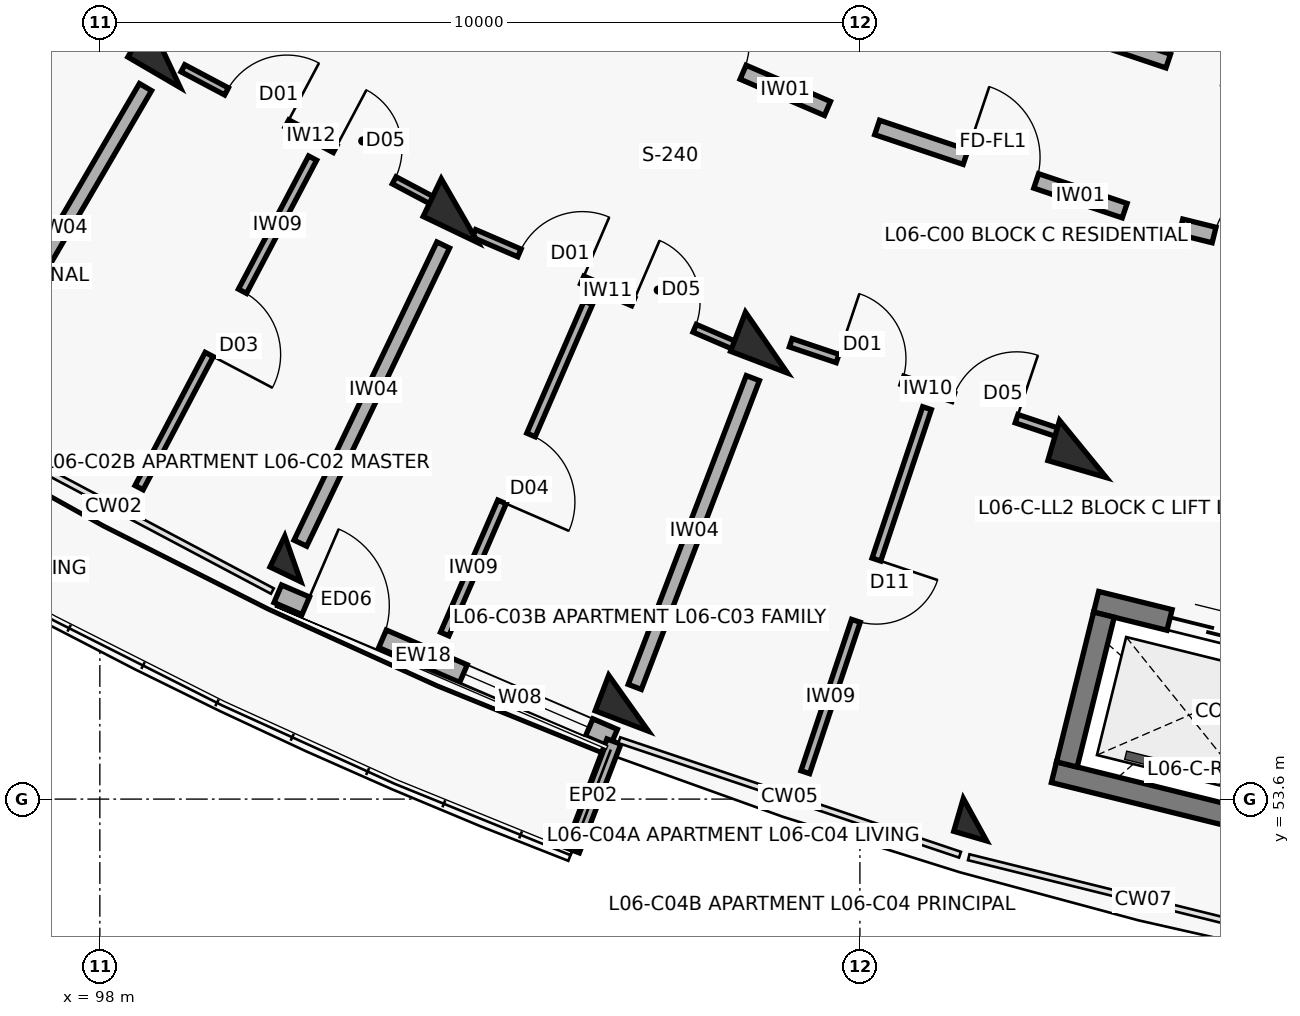
"""IFC4 building model, lengths in metres.
Left out: names, types, materials, properties, quantities, classifications, styles, units other than length and angle.
Written with IfcOpenShell. Run it as: python <this file> out.ifc"""

import sys

from ifc_helpers import new_model, si_unit, direction, frame, frame_2d, origin, origin_2d, place, context, subcontext, project, spatial, rectangle, extrude, element, fill, save


model = new_model("IFC4")
c1 = context("Model", 3, precision=1e-05, world=origin(), true_north=direction((0.0, 1.0)))
c2 = subcontext(c1, "Body", "Model", "MODEL_VIEW")
j1 = project(units=[si_unit("LENGTHUNIT", "METRE"), si_unit("PLANEANGLEUNIT", "RADIAN")], contexts=[c1])
p1 = place(None, origin())
s1 = spatial("IfcSite", under=j1, at=p1, CompositionType="ELEMENT")
p2 = place(p1, origin())
s2 = spatial("IfcBuilding", under=s1, at=p2, CompositionType="ELEMENT")
p3 = place(p2, frame((0.0, 0.0, 20.5)))
s3 = spatial("IfcBuildingStorey", under=s2, at=p3, CompositionType="ELEMENT", Elevation=20.5)
for number, where, z_axis, x_axis in (
    (1, (98.853, 63.4, 0.0), (0.0, 0.0, 1.0), (-0.504, -0.864, 0.0)),
    (2, (102.734, 61.341, 0.0), (0.0, 0.0, 1.0), (-0.432, -0.902, 0.0)),
):
    element("IfcColumn", number, at=place(p3, frame(where, z_axis=z_axis, x_axis=x_axis)), inside=s3, PredefinedType="COLUMN", context=c2, shape_type="SweptSolid", body=[
        extrude(rectangle(XDim=0.55, YDim=0.8, at=origin_2d()), origin(), (0.0, 0.0, 1.0), 3.1),
    ])
p4 = place(p3, frame((100.539, 56.76, 0.0), z_axis=(0.0, 0.0, 1.0), x_axis=(-0.432085748802, -0.901832526405, 0.0)))
e3 = element("IfcColumn", 3, at=p4, inside=s3, PredefinedType="COLUMN", context=c2, shape_type="SweptSolid", body=[
    extrude(rectangle(XDim=0.45, YDim=0.45, at=origin_2d()), origin(), (0.0, 0.0, 1.0), 3.1),
])
p5 = place(p3, frame((106.77, 59.606, 0.0), z_axis=(0.0, 0.0, 1.0), x_axis=(-0.357064076459, -0.934079892355, 0.0)))
e4 = element("IfcColumn", 4, at=p5, inside=s3, PredefinedType="COLUMN", context=c2, shape_type="SweptSolid", body=[
    extrude(rectangle(XDim=0.55, YDim=0.8, at=origin_2d()), origin(), (0.0, 0.0, 1.0), 3.1),
])
p6 = place(p3, frame((104.956, 54.861, 0.0), z_axis=(0.0, 0.0, 1.0), x_axis=(-0.357064076459, -0.934079892355, 0.0)))
e5 = element("IfcColumn", 5, at=p6, inside=s3, PredefinedType="COLUMN", context=c2, shape_type="SweptSolid", body=[
    extrude(rectangle(XDim=0.5, YDim=0.75, at=origin_2d()), origin(), (0.0, 0.0, 1.0), 3.1),
])
p7 = place(p3, frame((110.934, 58.207, 0.0), z_axis=(0.0, 0.0, 1.0), x_axis=(-0.27966144946, -0.96009867914, 0.0)))
e6 = element("IfcColumn", 6, at=p7, inside=s3, PredefinedType="COLUMN", context=c2, shape_type="SweptSolid", body=[
    extrude(rectangle(XDim=0.55, YDim=0.8, at=origin_2d()), origin(), (0.0, 0.0, 1.0), 3.1),
])
p8 = place(p3, frame((109.513, 53.329, 0.0), z_axis=(0.0, 0.0, 1.0), x_axis=(-0.27966144946, -0.96009867914, 0.0)))
e7 = element("IfcColumn", 7, at=p8, inside=s3, PredefinedType="COLUMN", context=c2, shape_type="SweptSolid", body=[
    extrude(rectangle(XDim=0.45, YDim=0.45, at=origin_2d()), origin(), (0.0, 0.0, 1.0), 3.1),
])
p9 = place(p3, frame((100.341, 56.301, 0.0), z_axis=(0.0, 0.0, 1.0), x_axis=(0.918737524932, -0.39486878869, 0.0)))
e8 = element("IfcWall", 8, at=p9, inside=s3, PredefinedType="SOLIDWALL", context=c2, shape_type="SweptSolid", body=[
    extrude(rectangle(XDim=4.809, YDim=0.252, at=frame_2d((2.405, 0.0))), origin(), (0.0, 0.0, 1.0), 2.25),
])
p10 = place(p9, frame((0.4, 0.0, 0.0)))
e9 = element("IfcOpeningElement", 9, at=p10, cuts=e8, PredefinedType="OPENING", context=c2, shape_type="SweptSolid", body=[
    extrude(rectangle(XDim=1.1, YDim=2.15, at=frame_2d((0.55, 1.075))), frame((0.0, 0.136, 0.0), z_axis=(0.0, -1.0, 0.0), x_axis=(1.0, 0.0, 0.0)), (0.0, 0.0, 1.0), 0.272),
])
p11 = place(p9, frame((2.659, 0.0, 0.35)))
e10 = element("IfcOpeningElement", 10, at=p11, cuts=e8, PredefinedType="OPENING", context=c2, shape_type="SweptSolid", body=[
    extrude(rectangle(XDim=1.8, YDim=1.65, at=frame_2d((0.9, 0.825))), frame((0.0, 0.136, 0.0), z_axis=(0.0, -1.0, 0.0), x_axis=(1.0, 0.0, 0.0)), (0.0, 0.0, 1.0), 0.272),
])
p12 = place(p3, frame((104.763, 54.357, 0.0), z_axis=(0.0, 0.0, 1.0), x_axis=(-0.356957296461, -0.934120703391, 0.0)))
e11 = element("IfcWall", 11, at=p12, inside=s3, PredefinedType="PARAPET", context=c2, shape_type="SweptSolid", body=[
    extrude(rectangle(XDim=1.53, YDim=0.195, at=frame_2d((0.765, 0.0))), origin(), (0.0, 0.0, 1.0), 2.25),
])
p13 = place(p3, frame((111.108, 56.196, 0.0), z_axis=(0.0, 0.0, 1.0), x_axis=(0.970706856107, -0.240266933861, 0.0)))
e12 = element("IfcWall", 12, at=p13, inside=s3, PredefinedType="SHEAR", context=c2, shape_type="SweptSolid", body=[
    extrude(rectangle(XDim=3.09, YDim=0.28, at=frame_2d((1.545, 0.0))), origin(), (0.0, 0.0, 1.0), 3.1),
])
p14 = place(p13, frame((0.995, 0.0, 0.0)))
e13 = element("IfcOpeningElement", 13, at=p14, cuts=e12, PredefinedType="OPENING", context=c2, shape_type="SweptSolid", body=[
    extrude(rectangle(XDim=1.1, YDim=2.15, at=frame_2d((0.55, 1.075))), frame((0.0, 0.15, 0.0), z_axis=(0.0, -1.0, 0.0), x_axis=(1.0, 0.0, 0.0)), (0.0, 0.0, 1.0), 0.3),
])
p15 = place(p3, frame((110.553, 53.954, 0.0), z_axis=(0.0, 0.0, 1.0), x_axis=(0.970725280816, -0.240192483614, 0.0)))
e14 = element("IfcWall", 14, at=p15, inside=s3, PredefinedType="SHEAR", context=c2, shape_type="SweptSolid", body=[
    extrude(rectangle(XDim=3.09, YDim=0.28, at=frame_2d((1.545, 0.0))), origin(), (0.0, 0.0, 1.0), 3.1),
])
p16 = place(p3, frame((111.21, 56.027, 0.0), z_axis=(0.0, 0.0, 1.0), x_axis=(-0.240186044774, -0.970726873995, 0.0)))
e15 = element("IfcWall", 15, at=p16, inside=s3, PredefinedType="SHEAR", context=c2, shape_type="SweptSolid", body=[
    extrude(rectangle(XDim=2.03, YDim=0.28, at=frame_2d((1.015, 0.0))), origin(), (0.0, 0.0, 1.0), 3.1),
])
p17 = place(p3, frame((98.504, 67.072, 0.0), z_axis=(0.0, 0.0, 1.0), x_axis=(-0.540338452216, -0.841447774408, 0.0)))
e16 = element("IfcWall", 16, at=p17, inside=s3, PredefinedType="PARTITIONING", context=c2, shape_type="SweptSolid", body=[
    extrude(rectangle(XDim=7.95, YDim=0.14, at=frame_2d((3.975, 0.0))), origin(), (0.0, 0.0, 1.0), 2.08),
])
p18 = place(p17, frame((6.05, 0.0, 0.0)))
e17 = element("IfcOpeningElement", 17, at=p18, cuts=e16, PredefinedType="OPENING", context=c2, shape_type="SweptSolid", body=[
    extrude(rectangle(XDim=0.92, YDim=2.1, at=frame_2d((0.46, 1.05))), frame((0.0, 0.08, 0.0), z_axis=(0.0, -1.0, 0.0), x_axis=(1.0, 0.0, 0.0)), (0.0, 0.0, 1.0), 0.16),
])
p19 = place(p3, frame((99.093, 63.216, 0.0), z_axis=(0.0, 0.0, 1.0), x_axis=(0.883432667361, -0.468558131121, 0.0)))
e18 = element("IfcWall", 18, at=p19, inside=s3, PredefinedType="PARTITIONING", context=c2, shape_type="SweptSolid", body=[
    extrude(rectangle(XDim=3.797, YDim=0.105, at=frame_2d((1.899, 0.0))), origin(), (0.0, 0.0, 1.0), 2.08),
])
p20 = place(p19, frame((0.65, 0.0, 0.0)))
e19 = element("IfcOpeningElement", 19, at=p20, cuts=e18, PredefinedType="OPENING", context=c2, shape_type="SweptSolid", body=[
    extrude(rectangle(XDim=0.9, YDim=2.1, at=frame_2d((0.45, 1.05))), frame((0.0, 0.062, 0.0), z_axis=(0.0, -1.0, 0.0), x_axis=(1.0, 0.0, 0.0)), (0.0, 0.0, 1.0), 0.125),
])
p21 = place(p19, frame((2.267, 0.0, 0.0)))
e20 = element("IfcOpeningElement", 20, at=p21, cuts=e18, PredefinedType="OPENING", context=c2, shape_type="SweptSolid", body=[
    extrude(rectangle(XDim=0.88, YDim=2.1, at=frame_2d((0.44, 1.05))), frame((0.0, 0.062, 0.0), z_axis=(0.0, -1.0, 0.0), x_axis=(1.0, 0.0, 0.0)), (0.0, 0.0, 1.0), 0.125),
])
p22 = place(p3, frame((100.799, 62.034, 0.0), z_axis=(0.0, 0.0, 1.0), x_axis=(-0.465869641373, -0.884853364828, 0.0)))
e21 = element("IfcWall", 21, at=p22, inside=s3, PredefinedType="PARTITIONING", context=c2, shape_type="SweptSolid", body=[
    extrude(rectangle(XDim=4.9, YDim=0.12, at=frame_2d((2.45, 0.0))), origin(), (0.0, 0.0, 1.0), 2.08),
])
p23 = place(p22, frame((1.98, 0.0, 0.0)))
e22 = element("IfcOpeningElement", 22, at=p23, cuts=e21, PredefinedType="OPENING", context=c2, shape_type="SweptSolid", body=[
    extrude(rectangle(XDim=0.94, YDim=2.1, at=frame_2d((0.47, 1.05))), frame((0.0, 0.07, 0.0), z_axis=(0.0, -1.0, 0.0), x_axis=(1.0, 0.0, 0.0)), (0.0, 0.0, 1.0), 0.14),
])
p24 = place(p3, frame((98.601, 62.968, 0.0), z_axis=(0.0, 0.0, 1.0), x_axis=(-0.504216452091, -0.863577309475, 0.0)))
e23 = element("IfcWall", 23, at=p24, inside=s3, PredefinedType="SOLIDWALL", context=c2, shape_type="SweptSolid", body=[
    extrude(rectangle(XDim=4.35, YDim=0.185, at=frame_2d((2.175, 0.0))), origin(), (0.0, 0.0, 1.0), 2.08),
])
p25 = place(p3, frame((104.417, 64.044, 0.0), z_axis=(0.0, 0.0, 1.0), x_axis=(0.918718172399, -0.394913813008, 0.0)))
e24 = element("IfcWall", 24, at=p25, inside=s3, PredefinedType="SOLIDWALL", context=c2, shape_type="SweptSolid", body=[
    extrude(rectangle(XDim=3.436, YDim=0.2, at=frame_2d((1.718, 0.0))), origin(), (0.0, 0.0, 1.0), 2.08),
])
p26 = place(p25, frame((1.208, 0.0, 0.0)))
e25 = element("IfcOpeningElement", 25, at=p26, cuts=e24, PredefinedType="OPENING", context=c2, shape_type="SweptSolid", body=[
    extrude(rectangle(XDim=1.02, YDim=2.15, at=frame_2d((0.51, 1.075))), frame((0.0, 0.11, 0.0), z_axis=(0.0, -1.0, 0.0), x_axis=(1.0, 0.0, 0.0)), (0.0, 0.0, 1.0), 0.22),
])
p27 = place(p3, frame((102.923, 61.042, 0.0), z_axis=(0.0, 0.0, 1.0), x_axis=(0.918716859611, -0.394916867033, 0.0)))
e26 = element("IfcWall", 26, at=p27, inside=s3, PredefinedType="PARTITIONING", context=c2, shape_type="SweptSolid", body=[
    extrude(rectangle(XDim=3.809, YDim=0.11, at=frame_2d((1.905, 0.0))), origin(), (0.0, 0.0, 1.0), 2.08),
])
p28 = place(p27, frame((0.65, 0.0, 0.0)))
e27 = element("IfcOpeningElement", 27, at=p28, cuts=e26, PredefinedType="OPENING", context=c2, shape_type="SweptSolid", body=[
    extrude(rectangle(XDim=0.9, YDim=2.1, at=frame_2d((0.45, 1.05))), frame((0.0, 0.065, 0.0), z_axis=(0.0, -1.0, 0.0), x_axis=(1.0, 0.0, 0.0)), (0.0, 0.0, 1.0), 0.13),
])
p29 = place(p27, frame((2.28, 0.0, 0.0)))
e28 = element("IfcOpeningElement", 28, at=p29, cuts=e26, PredefinedType="OPENING", context=c2, shape_type="SweptSolid", body=[
    extrude(rectangle(XDim=0.88, YDim=2.1, at=frame_2d((0.44, 1.05))), frame((0.0, 0.065, 0.0), z_axis=(0.0, -1.0, 0.0), x_axis=(1.0, 0.0, 0.0)), (0.0, 0.0, 1.0), 0.13),
])
p30 = place(p3, frame((104.426, 60.13, 0.0), z_axis=(0.0, 0.0, 1.0), x_axis=(-0.39765647791, -0.917534372967, 0.0)))
e29 = element("IfcWall", 29, at=p30, inside=s3, PredefinedType="PARTITIONING", context=c2, shape_type="SweptSolid", body=[
    extrude(rectangle(XDim=4.75, YDim=0.12, at=frame_2d((2.375, 0.0))), origin(), (0.0, 0.0, 1.0), 2.08),
])
p31 = place(p30, frame((1.895, 0.0, 0.0)))
e30 = element("IfcOpeningElement", 30, at=p31, cuts=e29, PredefinedType="OPENING", context=c2, shape_type="SweptSolid", body=[
    extrude(rectangle(XDim=0.96, YDim=2.1, at=frame_2d((0.48, 1.05))), frame((0.0, 0.07, 0.0), z_axis=(0.0, -1.0, 0.0), x_axis=(1.0, 0.0, 0.0)), (0.0, 0.0, 1.0), 0.14),
])
p32 = place(p3, frame((102.518, 60.89, 0.0), z_axis=(0.0, 0.0, 1.0), x_axis=(-0.432108769108, -0.901821496561, 0.0)))
e31 = element("IfcWall", 31, at=p32, inside=s3, PredefinedType="SOLIDWALL", context=c2, shape_type="SweptSolid", body=[
    extrude(rectangle(XDim=4.35, YDim=0.185, at=frame_2d((2.175, 0.0))), origin(), (0.0, 0.0, 1.0), 2.08),
])
p33 = place(p3, frame((108.227, 62.437, 0.0), z_axis=(0.0, 0.0, 1.0), x_axis=(0.947884468821, -0.318614239745, 0.0)))
e32 = element("IfcWall", 32, at=p33, inside=s3, PredefinedType="SOLIDWALL", context=c2, shape_type="SweptSolid", body=[
    extrude(rectangle(XDim=3.436, YDim=0.2, at=frame_2d((1.718, 0.0))), origin(), (0.0, 0.0, 1.0), 2.08),
])
p34 = place(p33, frame((1.228, 0.0, 0.0)))
e33 = element("IfcOpeningElement", 33, at=p34, cuts=e32, PredefinedType="OPENING", context=c2, shape_type="SweptSolid", body=[
    extrude(rectangle(XDim=0.98, YDim=2.15, at=frame_2d((0.49, 1.075))), frame((0.0, 0.11, 0.0), z_axis=(0.0, -1.0, 0.0), x_axis=(1.0, 0.0, 0.0)), (0.0, 0.0, 1.0), 0.22),
])
p35 = place(p3, frame((108.958, 64.352, 0.0), z_axis=(0.0, 0.0, 1.0), x_axis=(0.94787351033, -0.318646839643, 0.0)))
e34 = element("IfcWall", 34, at=p35, inside=s3, PredefinedType="SOLIDWALL", context=c2, shape_type="SweptSolid", body=[
    extrude(rectangle(XDim=3.269, YDim=0.19, at=frame_2d((1.634, 0.0))), origin(), (0.0, 0.0, 1.0), 2.08),
])
p36 = place(p35, frame((1.184, 0.0, 0.0)))
e35 = element("IfcOpeningElement", 35, at=p36, cuts=e34, PredefinedType="OPENING", context=c2, shape_type="SweptSolid", body=[
    extrude(rectangle(XDim=0.9, YDim=2.1, at=frame_2d((0.45, 1.05))), frame((0.0, 0.105, 0.0), z_axis=(0.0, -1.0, 0.0), x_axis=(1.0, 0.0, 0.0)), (0.0, 0.0, 1.0), 0.21),
])
p37 = place(p3, frame((107.09, 59.604, 0.0), z_axis=(0.0, 0.0, 1.0), x_axis=(0.947873924847, -0.318645606584, 0.0)))
e36 = element("IfcWall", 36, at=p37, inside=s3, PredefinedType="PARTITIONING", context=c2, shape_type="SweptSolid", body=[
    extrude(rectangle(XDim=3.785, YDim=0.115, at=frame_2d((1.893, 0.0))), origin(), (0.0, 0.0, 1.0), 2.08),
])
p38 = place(p37, frame((0.65, 0.0, 0.0)))
e37 = element("IfcOpeningElement", 37, at=p38, cuts=e36, PredefinedType="OPENING", context=c2, shape_type="SweptSolid", body=[
    extrude(rectangle(XDim=0.9, YDim=2.1, at=frame_2d((0.45, 1.05))), frame((0.0, 0.067, 0.0), z_axis=(0.0, -1.0, 0.0), x_axis=(1.0, 0.0, 0.0)), (0.0, 0.0, 1.0), 0.135),
])
p39 = place(p37, frame((2.255, 0.0, 0.0)))
e38 = element("IfcOpeningElement", 38, at=p39, cuts=e36, PredefinedType="OPENING", context=c2, shape_type="SweptSolid", body=[
    extrude(rectangle(XDim=0.88, YDim=2.1, at=frame_2d((0.44, 1.05))), frame((0.0, 0.067, 0.0), z_axis=(0.0, -1.0, 0.0), x_axis=(1.0, 0.0, 0.0)), (0.0, 0.0, 1.0), 0.135),
])
p40 = place(p3, frame((108.883, 58.743, 0.0), z_axis=(0.0, 0.0, 1.0), x_axis=(-0.317199358555, -0.948358880874, 0.0)))
e39 = element("IfcWall", 39, at=p40, inside=s3, PredefinedType="PARTITIONING", context=c2, shape_type="SweptSolid", body=[
    extrude(rectangle(XDim=5.05, YDim=0.12, at=frame_2d((2.525, 0.0))), origin(), (0.0, 0.0, 1.0), 2.08),
])
p41 = place(p40, frame((2.1, 0.0, 0.0)))
e40 = element("IfcOpeningElement", 40, at=p41, cuts=e39, PredefinedType="OPENING", context=c2, shape_type="SweptSolid", body=[
    extrude(rectangle(XDim=0.85, YDim=2.1, at=frame_2d((0.425, 1.05))), frame((0.0, 0.07, 0.0), z_axis=(0.0, -1.0, 0.0), x_axis=(1.0, 0.0, 0.0)), (0.0, 0.0, 1.0), 0.14),
])
p42 = place(p3, frame((106.591, 59.139, 0.0), z_axis=(0.0, 0.0, 1.0), x_axis=(-0.357064016205, -0.934079915388, 0.0)))
e41 = element("IfcWall", 41, at=p42, inside=s3, PredefinedType="SOLIDWALL", context=c2, shape_type="SweptSolid", body=[
    extrude(rectangle(XDim=4.35, YDim=0.185, at=frame_2d((2.175, 0.0))), origin(), (0.0, 0.0, 1.0), 2.08),
])
p43 = place(p3, frame((112.223, 61.13, 0.0), z_axis=(0.0, 0.0, 1.0), x_axis=(0.970719238682, -0.240216901263, 0.0)))
e42 = element("IfcWall", 42, at=p43, inside=s3, PredefinedType="SOLIDWALL", context=c2, shape_type="SweptSolid", body=[
    extrude(rectangle(XDim=3.296, YDim=0.21, at=frame_2d((1.648, 0.0))), origin(), (0.0, 0.0, 1.0), 2.08),
])
p44 = place(p43, frame((0.45, 0.0, 0.0)))
e43 = element("IfcOpeningElement", 43, at=p44, cuts=e42, PredefinedType="OPENING", context=c2, shape_type="SweptSolid", body=[
    extrude(rectangle(XDim=1.1, YDim=2.15, at=frame_2d((0.55, 1.075))), frame((0.0, 0.115, 0.0), z_axis=(0.0, -1.0, 0.0), x_axis=(1.0, 0.0, 0.0)), (0.0, 0.0, 1.0), 0.23),
])
p45 = place(p43, frame((1.726, 0.0, 0.0)))
e44 = element("IfcOpeningElement", 44, at=p45, cuts=e42, PredefinedType="OPENING", context=c2, shape_type="SweptSolid", body=[
    extrude(rectangle(XDim=1.12, YDim=2.15, at=frame_2d((0.56, 1.075))), frame((0.0, 0.115, 0.0), z_axis=(0.0, -1.0, 0.0), x_axis=(1.0, 0.0, 0.0)), (0.0, 0.0, 1.0), 0.23),
])
p46 = place(p10, origin())
e45 = element("IfcDoor", 45, at=p46, inside=s3, OperationType="SINGLE_SWING_LEFT", PredefinedType="DOOR", context=c2, shape_type="SweptSolid", body=[
    extrude(rectangle(XDim=1.1, YDim=2.15, at=frame_2d((0.55, 1.075))), frame((0.0, 0.025, 0.0), z_axis=(0.0, -1.0, 0.0), x_axis=(1.0, 0.0, 0.0)), (0.0, 0.0, 1.0), 0.05),
])
fill(e9, e45)
p47 = place(p11, origin())
e46 = element("IfcWindow", 46, at=p47, inside=s3, PartitioningType="TRIPLE_PANEL_VERTICAL", PredefinedType="WINDOW", context=c2, shape_type="SweptSolid", body=[
    extrude(rectangle(XDim=1.8, YDim=1.65, at=frame_2d((0.9, 0.825))), frame((0.0, 0.03, 0.0), z_axis=(0.0, -1.0, 0.0), x_axis=(1.0, 0.0, 0.0)), (0.0, 0.0, 1.0), 0.06),
])
fill(e10, e46)
p48 = place(p14, origin())
e47 = element("IfcDoor", 47, at=p48, inside=s3, OperationType="DOUBLE_DOOR_SLIDING", PredefinedType="DOOR", context=c2, shape_type="SweptSolid", body=[
    extrude(rectangle(XDim=1.1, YDim=2.15, at=frame_2d((0.55, 1.075))), frame((0.0, 0.025, 0.0), z_axis=(0.0, -1.0, 0.0), x_axis=(1.0, 0.0, 0.0)), (0.0, 0.0, 1.0), 0.05),
])
fill(e13, e47)
p49 = place(p20, origin())
e48 = element("IfcDoor", 48, at=p49, inside=s3, OperationType="SINGLE_SWING_RIGHT", PredefinedType="DOOR", context=c2, shape_type="SweptSolid", body=[
    extrude(rectangle(XDim=0.9, YDim=2.1, at=frame_2d((0.45, 1.05))), frame((0.0, 0.025, 0.0), z_axis=(0.0, -1.0, 0.0), x_axis=(1.0, 0.0, 0.0)), (0.0, 0.0, 1.0), 0.05),
])
fill(e19, e48)
p50 = place(p21, origin())
e49 = element("IfcDoor", 49, at=p50, inside=s3, OperationType="SINGLE_SWING_LEFT", PredefinedType="DOOR", context=c2, shape_type="SweptSolid", body=[
    extrude(rectangle(XDim=0.88, YDim=2.1, at=frame_2d((0.44, 1.05))), frame((0.0, 0.025, 0.0), z_axis=(0.0, -1.0, 0.0), x_axis=(1.0, 0.0, 0.0)), (0.0, 0.0, 1.0), 0.05),
])
fill(e20, e49)
p51 = place(p23, origin())
e50 = element("IfcDoor", 50, at=p51, inside=s3, OperationType="SINGLE_SWING_RIGHT", PredefinedType="DOOR", context=c2, shape_type="SweptSolid", body=[
    extrude(rectangle(XDim=0.94, YDim=2.1, at=frame_2d((0.47, 1.05))), frame((0.0, 0.025, 0.0), z_axis=(0.0, -1.0, 0.0), x_axis=(1.0, 0.0, 0.0)), (0.0, 0.0, 1.0), 0.05),
])
fill(e22, e50)
p52 = place(p26, origin())
e51 = element("IfcDoor", 51, at=p52, inside=s3, OperationType="SINGLE_SWING_LEFT", PredefinedType="DOOR", context=c2, shape_type="SweptSolid", body=[
    extrude(rectangle(XDim=1.02, YDim=2.15, at=frame_2d((0.51, 1.075))), frame((0.0, 0.025, 0.0), z_axis=(0.0, -1.0, 0.0), x_axis=(1.0, 0.0, 0.0)), (0.0, 0.0, 1.0), 0.05),
])
fill(e25, e51)
p53 = place(p28, origin())
e52 = element("IfcDoor", 52, at=p53, inside=s3, OperationType="SINGLE_SWING_RIGHT", PredefinedType="DOOR", context=c2, shape_type="SweptSolid", body=[
    extrude(rectangle(XDim=0.9, YDim=2.1, at=frame_2d((0.45, 1.05))), frame((0.0, 0.025, 0.0), z_axis=(0.0, -1.0, 0.0), x_axis=(1.0, 0.0, 0.0)), (0.0, 0.0, 1.0), 0.05),
])
fill(e27, e52)
p54 = place(p29, origin())
e53 = element("IfcDoor", 53, at=p54, inside=s3, OperationType="SINGLE_SWING_LEFT", PredefinedType="DOOR", context=c2, shape_type="SweptSolid", body=[
    extrude(rectangle(XDim=0.88, YDim=2.1, at=frame_2d((0.44, 1.05))), frame((0.0, 0.025, 0.0), z_axis=(0.0, -1.0, 0.0), x_axis=(1.0, 0.0, 0.0)), (0.0, 0.0, 1.0), 0.05),
])
fill(e28, e53)
p55 = place(p31, origin())
e54 = element("IfcDoor", 54, at=p55, inside=s3, OperationType="SINGLE_SWING_RIGHT", PredefinedType="DOOR", context=c2, shape_type="SweptSolid", body=[
    extrude(rectangle(XDim=0.96, YDim=2.1, at=frame_2d((0.48, 1.05))), frame((0.0, 0.025, 0.0), z_axis=(0.0, -1.0, 0.0), x_axis=(1.0, 0.0, 0.0)), (0.0, 0.0, 1.0), 0.05),
])
fill(e30, e54)
p56 = place(p34, origin())
e55 = element("IfcDoor", 55, at=p56, inside=s3, OperationType="SINGLE_SWING_LEFT", PredefinedType="DOOR", context=c2, shape_type="SweptSolid", body=[
    extrude(rectangle(XDim=0.98, YDim=2.15, at=frame_2d((0.49, 1.075))), frame((0.0, 0.025, 0.0), z_axis=(0.0, -1.0, 0.0), x_axis=(1.0, 0.0, 0.0)), (0.0, 0.0, 1.0), 0.05),
])
fill(e33, e55)
p57 = place(p38, origin())
e56 = element("IfcDoor", 56, at=p57, inside=s3, OperationType="SINGLE_SWING_LEFT", PredefinedType="DOOR", context=c2, shape_type="SweptSolid", body=[
    extrude(rectangle(XDim=0.9, YDim=2.1, at=frame_2d((0.45, 1.05))), frame((0.0, 0.025, 0.0), z_axis=(0.0, -1.0, 0.0), x_axis=(1.0, 0.0, 0.0)), (0.0, 0.0, 1.0), 0.05),
])
fill(e37, e56)
p58 = place(p39, origin())
e57 = element("IfcDoor", 57, at=p58, inside=s3, OperationType="SINGLE_SWING_RIGHT", PredefinedType="DOOR", context=c2, shape_type="SweptSolid", body=[
    extrude(rectangle(XDim=0.88, YDim=2.1, at=frame_2d((0.44, 1.05))), frame((0.0, 0.025, 0.0), z_axis=(0.0, -1.0, 0.0), x_axis=(1.0, 0.0, 0.0)), (0.0, 0.0, 1.0), 0.05),
])
fill(e38, e57)
p59 = place(p41, origin())
e58 = element("IfcDoor", 58, at=p59, inside=s3, OperationType="SINGLE_SWING_LEFT", PredefinedType="DOOR", context=c2, shape_type="SweptSolid", body=[
    extrude(rectangle(XDim=0.85, YDim=2.1, at=frame_2d((0.425, 1.05))), frame((0.0, 0.025, 0.0), z_axis=(0.0, -1.0, 0.0), x_axis=(1.0, 0.0, 0.0)), (0.0, 0.0, 1.0), 0.05),
])
fill(e40, e58)
p60 = place(p44, origin())
e59 = element("IfcDoor", 59, at=p60, inside=s3, OperationType="SINGLE_SWING_RIGHT", PredefinedType="DOOR", context=c2, shape_type="SweptSolid", body=[
    extrude(rectangle(XDim=1.1, YDim=2.15, at=frame_2d((0.55, 1.075))), frame((0.0, 0.025, 0.0), z_axis=(0.0, -1.0, 0.0), x_axis=(1.0, 0.0, 0.0)), (0.0, 0.0, 1.0), 0.05),
])
fill(e43, e59)
save(model, sys.argv[1])
